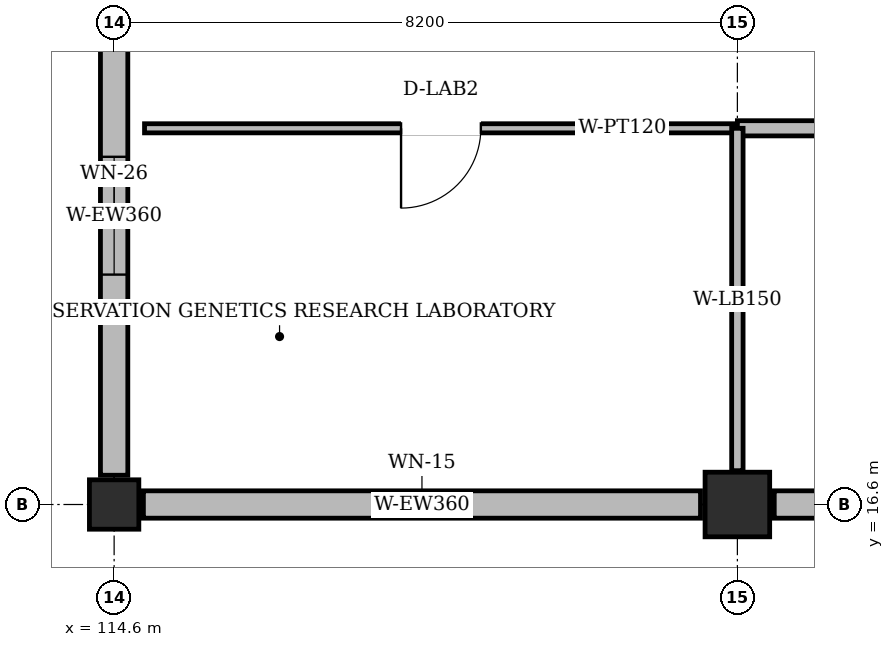
"""IFC4 building model, lengths in metres.
Left out: names, types, materials, properties, quantities, classifications, styles, units other than length and angle.
Written with IfcOpenShell. Run it as: python <this file> out.ifc"""

import sys

from ifc_helpers import new_model, si_unit, direction, frame, frame_2d, origin, origin_2d, place, context, subcontext, project, spatial, rectangle, extrude, element, fill, save


model = new_model("IFC4")
c1 = context("Model", 3, precision=1e-05, world=origin(), true_north=direction((0.0, 1.0)))
c2 = subcontext(c1, "Body", "Model", "MODEL_VIEW")
j1 = project(units=[si_unit("LENGTHUNIT", "METRE"), si_unit("PLANEANGLEUNIT", "RADIAN")], contexts=[c1])
p1 = place(None, origin())
s1 = spatial("IfcSite", under=j1, at=p1, CompositionType="ELEMENT")
p2 = place(p1, origin())
s2 = spatial("IfcBuilding", under=s1, at=p2, CompositionType="ELEMENT")
p3 = place(p2, frame((0.0, 0.0, 28.2)))
s3 = spatial("IfcBuildingStorey", under=s2, at=p3, CompositionType="ELEMENT", Elevation=28.2)
p4 = place(p3, frame((114.6, 16.6, 0.0), z_axis=(0.0, 0.0, 1.0), x_axis=(1.0, 0.0, 0.0)))
e1 = element("IfcColumn", 1, at=p4, inside=s3, PredefinedType="COLUMN", context=c2, shape_type="SweptSolid", body=[
    extrude(rectangle(XDim=0.65, YDim=0.65, at=origin_2d()), origin(), (0.0, 0.0, 1.0), 3.94),
])
p5 = place(p3, frame((122.8, 16.6, 0.0), z_axis=(0.0, 0.0, 1.0), x_axis=(1.0, 0.0, 0.0)))
e2 = element("IfcColumn", 2, at=p5, inside=s3, PredefinedType="COLUMN", context=c2, shape_type="SweptSolid", body=[
    extrude(rectangle(XDim=0.85, YDim=0.85, at=origin_2d()), origin(), (0.0, 0.0, 1.0), 3.94),
])
p6 = place(p3, frame((114.985, 16.6, 0.0), z_axis=(0.0, 0.0, 1.0), x_axis=(1.0, 0.0, 0.0)))
e3 = element("IfcWall", 3, at=p6, inside=s3, PredefinedType="SOLIDWALL", context=c2, shape_type="SweptSolid", body=[
    extrude(rectangle(XDim=7.33, YDim=0.36, at=frame_2d((3.665, 0.0))), origin(), (0.0, 0.0, 1.0), 3.325),
])
p7 = place(p6, frame((3.19, 0.0, 0.95)))
e4 = element("IfcOpeningElement", 4, at=p7, cuts=e3, PredefinedType="OPENING", context=c2, shape_type="SweptSolid", body=[
    extrude(rectangle(XDim=0.95, YDim=1.75, at=frame_2d((0.475, 0.875))), frame((0.0, 0.192, 0.0), z_axis=(0.0, -1.0, 0.0), x_axis=(1.0, 0.0, 0.0)), (0.0, 0.0, 1.0), 0.384),
])
p8 = place(p3, frame((123.285, 16.6, 0.0), z_axis=(0.0, 0.0, 1.0), x_axis=(1.0, 0.0, 0.0)))
e5 = element("IfcWall", 5, at=p8, inside=s3, PredefinedType="SOLIDWALL", context=c2, shape_type="SweptSolid", body=[
    extrude(rectangle(XDim=7.23, YDim=0.36, at=frame_2d((3.615, 0.0))), origin(), (0.0, 0.0, 1.0), 3.325),
])
p9 = place(p8, frame((3.04, 0.0, 0.95)))
e6 = element("IfcOpeningElement", 6, at=p9, cuts=e5, PredefinedType="OPENING", context=c2, shape_type="SweptSolid", body=[
    extrude(rectangle(XDim=1.15, YDim=1.5, at=frame_2d((0.575, 0.75))), frame((0.0, 0.192, 0.0), z_axis=(0.0, -1.0, 0.0), x_axis=(1.0, 0.0, 0.0)), (0.0, 0.0, 1.0), 0.384),
])
p10 = place(p3, frame((114.6, 23.815, 0.0), z_axis=(0.0, 0.0, 1.0), x_axis=(0.0, -1.0, 0.0)))
e7 = element("IfcWall", 7, at=p10, inside=s3, PredefinedType="SOLIDWALL", context=c2, shape_type="SweptSolid", body=[
    extrude(rectangle(XDim=6.83, YDim=0.36, at=frame_2d((3.415, 0.0))), origin(), (0.0, 0.0, 1.0), 3.325),
])
p11 = place(p10, frame((2.64, 0.0, 0.95)))
e8 = element("IfcOpeningElement", 8, at=p11, cuts=e7, PredefinedType="OPENING", context=c2, shape_type="SweptSolid", body=[
    extrude(rectangle(XDim=1.55, YDim=1.5, at=frame_2d((0.775, 0.75))), frame((0.0, 0.192, 0.0), z_axis=(0.0, -1.0, 0.0), x_axis=(1.0, 0.0, 0.0)), (0.0, 0.0, 1.0), 0.384),
])
p12 = place(p3, frame((122.8, 21.55, 0.0), z_axis=(0.0, 0.0, 1.0), x_axis=(-1.0, 0.0, 0.0)))
e9 = element("IfcWall", 9, at=p12, inside=s3, PredefinedType="PARTITIONING", context=c2, shape_type="SweptSolid", body=[
    extrude(rectangle(XDim=7.8, YDim=0.12, at=frame_2d((3.9, 0.0))), origin(), (0.0, 0.0, 1.0), 3.645),
])
p13 = place(p12, frame((3.375, 0.0, 0.0)))
e10 = element("IfcOpeningElement", 10, at=p13, cuts=e9, PredefinedType="OPENING", context=c2, shape_type="SweptSolid", body=[
    extrude(rectangle(XDim=1.05, YDim=2.2, at=frame_2d((0.525, 1.1))), frame((0.0, 0.072, 0.0), z_axis=(0.0, -1.0, 0.0), x_axis=(1.0, 0.0, 0.0)), (0.0, 0.0, 1.0), 0.144),
])
p14 = place(p3, frame((147.95, 21.55, 0.0), z_axis=(0.0, 0.0, 1.0), x_axis=(-1.0, 0.0, 0.0)))
e11 = element("IfcWall", 11, at=p14, inside=s3, PredefinedType="PARTITIONING", context=c2, shape_type="SweptSolid", body=[
    extrude(rectangle(XDim=25.15, YDim=0.2, at=frame_2d((12.575, 0.0))), origin(), (0.0, 0.0, 1.0), 3.515),
])
p15 = place(p14, frame((11.775, 0.0, 0.0)))
e12 = element("IfcOpeningElement", 12, at=p15, cuts=e11, PredefinedType="OPENING", context=c2, shape_type="SweptSolid", body=[
    extrude(rectangle(XDim=1.6, YDim=2.3, at=frame_2d((0.8, 1.15))), frame((0.0, 0.112, 0.0), z_axis=(0.0, -1.0, 0.0), x_axis=(1.0, 0.0, 0.0)), (0.0, 0.0, 1.0), 0.224),
])
p16 = place(p3, frame((122.8, 21.55, 0.0), z_axis=(0.0, 0.0, 1.0), x_axis=(0.0, -1.0, 0.0)))
e13 = element("IfcWall", 13, at=p16, inside=s3, PredefinedType="PARTITIONING", context=c2, shape_type="SweptSolid", body=[
    extrude(rectangle(XDim=4.505, YDim=0.15, at=frame_2d((2.252, 0.0))), origin(), (0.0, 0.0, 1.0), 3.275),
])
p17 = place(p7, origin())
e14 = element("IfcWindow", 14, at=p17, inside=s3, PartitioningType="SINGLE_PANEL", PredefinedType="WINDOW", context=c2, shape_type="SweptSolid", body=[
    extrude(rectangle(XDim=0.95, YDim=1.75, at=frame_2d((0.475, 0.875))), frame((0.0, 0.03, 0.0), z_axis=(0.0, -1.0, 0.0), x_axis=(1.0, 0.0, 0.0)), (0.0, 0.0, 1.0), 0.06),
])
fill(e4, e14)
p18 = place(p11, origin())
e15 = element("IfcWindow", 15, at=p18, inside=s3, PartitioningType="DOUBLE_PANEL_VERTICAL", PredefinedType="WINDOW", context=c2, shape_type="SweptSolid", body=[
    extrude(rectangle(XDim=1.55, YDim=1.5, at=frame_2d((0.775, 0.75))), frame((0.0, 0.03, 0.0), z_axis=(0.0, -1.0, 0.0), x_axis=(1.0, 0.0, 0.0)), (0.0, 0.0, 1.0), 0.06),
])
fill(e8, e15)
p19 = place(p13, origin())
e16 = element("IfcDoor", 16, at=p19, inside=s3, OperationType="SINGLE_SWING_RIGHT", PredefinedType="DOOR", context=c2, shape_type="SweptSolid", body=[
    extrude(rectangle(XDim=1.05, YDim=2.2, at=frame_2d((0.525, 1.1))), frame((0.0, 0.025, 0.0), z_axis=(0.0, -1.0, 0.0), x_axis=(1.0, 0.0, 0.0)), (0.0, 0.0, 1.0), 0.05),
])
fill(e10, e16)
save(model, sys.argv[1])
